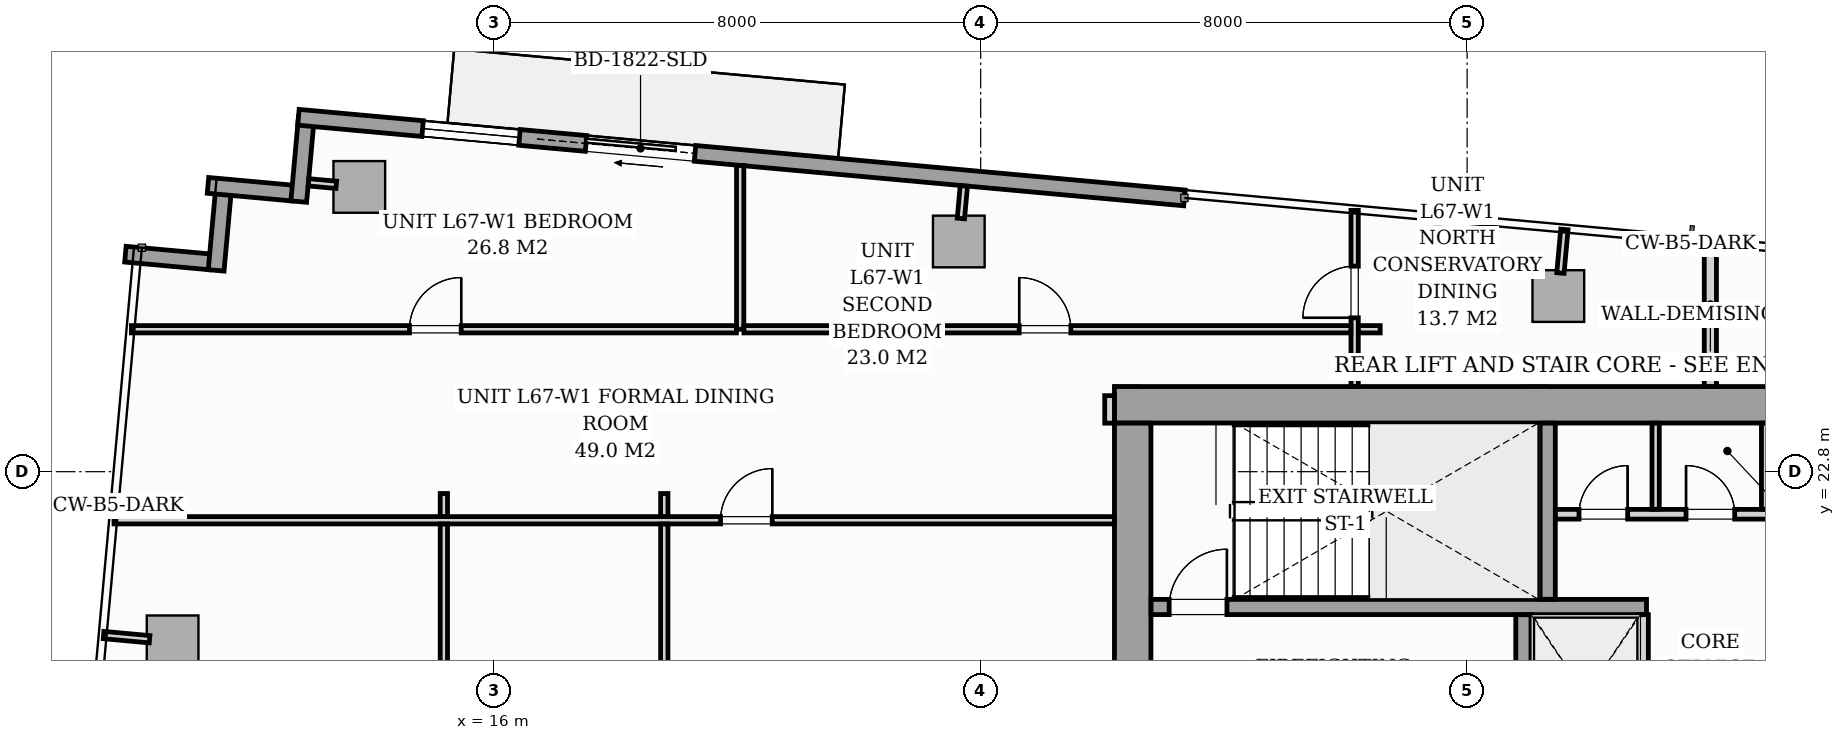
"""IFC4 building model, lengths in metres.
Left out: names, types, materials, properties, quantities, classifications, styles, units other than length and angle.
Written with IfcOpenShell. Run it as: python <this file> out.ifc"""

import sys

from ifc_helpers import new_model, si_unit, direction, frame, frame_2d, origin, origin_2d, place, context, subcontext, project, spatial, rectangle, i_section, extrude, source, transform, mapped, element, fill, save


model = new_model("IFC4")
c1 = context("Model", 3, precision=1e-05, world=origin(), true_north=direction((0.0, 1.0)))
c2 = subcontext(c1, "Body", "Model", "MODEL_VIEW")
j1 = project(units=[si_unit("LENGTHUNIT", "METRE"), si_unit("PLANEANGLEUNIT", "RADIAN")], contexts=[c1])
p1 = place(None, origin())
s1 = spatial("IfcSite", under=j1, at=p1, CompositionType="ELEMENT")
p2 = place(p1, origin())
s2 = spatial("IfcBuilding", under=s1, at=p2, CompositionType="ELEMENT")
p3 = place(p2, frame((0.0, 0.0, 233.1)))
s3 = spatial("IfcBuildingStorey", under=s2, at=p3, CompositionType="ELEMENT", Elevation=233.1)
m1 = source(origin(), c2, "Body", "SweptSolid", [
    extrude(i_section(OverallWidth=0.409, OverallDepth=0.425, WebThickness=0.033, FlangeThickness=0.052, FilletRadius=0.018, at=origin_2d()), origin(), (0.0, 0.0, 1.0), 3.296),
])
for number, where, z_axis, x_axis in (
    (1, (26.4, 24.0, 0.002), (0.0, 0.0, 1.0), (1.0, 0.0, 0.0)),
    (2, (33.12, 24.0, 0.002), (0.0, 0.0, 1.0), (1.0, 0.0, 0.0)),
):
    element("IfcColumn", number, at=place(p3, frame(where, z_axis=z_axis, x_axis=x_axis)), inside=s3, PredefinedType="PILASTER", context=c2, shape_type="MappedRepresentation", body=[
        mapped(m1, transform((0.0, 0.0, 0.0), scale=1.0)),
    ])
m2 = source(origin(), c2, "Body", "SweptSolid", [
    extrude(rectangle(XDim=0.85, YDim=0.85, at=origin_2d()), origin(), (0.0, 0.0, 1.0), 3.296),
])
for number, where, z_axis, x_axis in (
    (3, (13.781, 27.483, 0.002), (0.0, 0.0, 1.0), (0.996, -0.091, 0.0)),
    (4, (23.64, 26.585, 0.002), (0.0, 0.0, 1.0), (0.996, -0.091, 0.0)),
    (5, (33.5, 25.688, 0.002), (0.0, 0.0, 1.0), (0.996, -0.091, 0.0)),
    (6, (10.711, 20.01, 0.002), (0.0, 0.0, 1.0), (0.996, -0.091, 0.0)),
):
    element("IfcColumn", number, at=place(p3, frame(where, z_axis=z_axis, x_axis=x_axis)), inside=s3, PredefinedType="COLUMN", context=c2, shape_type="MappedRepresentation", body=[
        mapped(m2, transform((0.0, 0.0, 0.0), scale=1.0)),
    ])
for number, where, z_axis, x_axis in (
    (7, (9.935, 26.377, 0.0), (0.0, 0.0, 1.0), (0.996, -0.091, 0.0)),
    (8, (11.427, 26.111, 0.0), (0.0, 0.0, 1.0), (0.091, 0.996, 0.0)),
):
    element("IfcWall", number, at=place(p3, frame(where, z_axis=z_axis, x_axis=x_axis)), inside=s3, PredefinedType="STANDARD", context=c2, shape_type="SweptSolid", body=[
        extrude(rectangle(XDim=1.395, YDim=0.26, at=frame_2d((0.698, 0.0))), origin(), (0.0, 0.0, 1.0), 3.04),
    ])
p4 = place(p3, frame((11.293, 27.508, 0.0), z_axis=(0.0, 0.0, 1.0), x_axis=(0.995883159782, -0.090646191665, 0.0)))
e9 = element("IfcWall", 9, at=p4, inside=s3, PredefinedType="STANDARD", context=c2, shape_type="SweptSolid", body=[
    extrude(rectangle(XDim=1.395, YDim=0.26, at=frame_2d((0.698, 0.0))), origin(), (0.0, 0.0, 1.0), 3.04),
])
p5 = place(p3, frame((12.785, 27.242, 0.0), z_axis=(0.0, 0.0, 1.0), x_axis=(0.090472632758, 0.995898942023, 0.0)))
e10 = element("IfcWall", 10, at=p5, inside=s3, PredefinedType="STANDARD", context=c2, shape_type="SweptSolid", body=[
    extrude(rectangle(XDim=1.395, YDim=0.26, at=frame_2d((0.698, 0.0))), origin(), (0.0, 0.0, 1.0), 3.04),
])
p6 = place(p3, frame((12.781, 28.628, 0.0), z_axis=(0.0, 0.0, 1.0), x_axis=(0.995884584572, -0.090630536861, 0.0)))
e11 = element("IfcWall", 11, at=p6, inside=s3, PredefinedType="STANDARD", context=c2, shape_type="SweptSolid", body=[
    extrude(rectangle(XDim=14.63, YDim=0.26, at=frame_2d((7.315, 0.0))), origin(), (0.0, 0.0, 1.0), 3.04),
])
p7 = place(p6, frame((4.749, 0.0, 0.0)))
e12 = element("IfcOpeningElement", 12, at=p7, cuts=e11, PredefinedType="OPENING", context=c2, shape_type="SweptSolid", body=[
    extrude(rectangle(XDim=1.8, YDim=2.06, at=frame_2d((0.9, 1.03))), frame((0.0, 0.14, 0.0), z_axis=(0.0, -1.0, 0.0), x_axis=(1.0, 0.0, 0.0)), (0.0, 0.0, 1.0), 0.28),
])
p8 = place(p6, frame((2.05, 0.0, 0.65)))
e13 = element("IfcOpeningElement", 13, at=p8, cuts=e11, PredefinedType="OPENING", context=c2, shape_type="SweptSolid", body=[
    extrude(rectangle(XDim=1.6, YDim=1.5, at=frame_2d((0.8, 0.75))), frame((0.0, 0.14, 0.0), z_axis=(0.0, -1.0, 0.0), x_axis=(1.0, 0.0, 0.0)), (0.0, 0.0, 1.0), 0.28),
])
p9 = place(p3, frame((26.2, 23.9, 0.0), z_axis=(0.0, 0.0, 1.0), x_axis=(1.0, 0.0, 0.0)))
e14 = element("IfcWall", 14, at=p9, inside=s3, PredefinedType="SHEAR", context=c2, shape_type="SweptSolid", body=[
    extrude(rectangle(XDim=19.6, YDim=0.6, at=frame_2d((9.8, 0.0))), origin(), (0.0, 0.0, 1.0), 3.3),
])
p10 = place(p3, frame((26.5, 17.802, 0.0), z_axis=(0.0, 0.0, 1.0), x_axis=(0.0, 1.0, 0.0)))
e15 = element("IfcWall", 15, at=p10, inside=s3, PredefinedType="SHEAR", context=c2, shape_type="SweptSolid", body=[
    extrude(rectangle(XDim=5.796, YDim=0.6, at=frame_2d((2.898, 0.0))), origin(), (0.0, 0.0, 1.0), 3.3),
])
p11 = place(p3, frame((26.802, 20.575, 0.0), z_axis=(0.0, 0.0, 1.0), x_axis=(1.0, 0.0, 0.0)))
e16 = element("IfcWall", 16, at=p11, inside=s3, PredefinedType="SOLIDWALL", context=c2, shape_type="SweptSolid", body=[
    extrude(rectangle(XDim=8.148, YDim=0.25, at=frame_2d((4.074, 0.0))), origin(), (0.0, 0.0, 1.0), 3.3),
])
p12 = place(p11, frame((0.298, 0.0, 0.0)))
e17 = element("IfcOpeningElement", 17, at=p12, cuts=e16, PredefinedType="OPENING", context=c2, shape_type="SweptSolid", body=[
    extrude(rectangle(XDim=0.95, YDim=2.06, at=frame_2d((0.475, 1.03))), frame((0.0, 0.135, 0.0), z_axis=(0.0, -1.0, 0.0), x_axis=(1.0, 0.0, 0.0)), (0.0, 0.0, 1.0), 0.27),
])
p13 = place(p3, frame((33.325, 20.702, 0.0), z_axis=(0.0, 0.0, 1.0), x_axis=(0.0, 1.0, 0.0)))
e18 = element("IfcWall", 18, at=p13, inside=s3, PredefinedType="SOLIDWALL", context=c2, shape_type="SweptSolid", body=[
    extrude(rectangle(XDim=2.896, YDim=0.25, at=frame_2d((1.448, 0.0))), origin(), (0.0, 0.0, 1.0), 3.3),
])
p14 = place(p3, frame((32.925, 17.802, 0.0), z_axis=(0.0, 0.0, 1.0), x_axis=(0.0, 1.0, 0.0)))
e19 = element("IfcWall", 19, at=p14, inside=s3, PredefinedType="SOLIDWALL", context=c2, shape_type="SweptSolid", body=[
    extrude(rectangle(XDim=2.646, YDim=0.25, at=frame_2d((1.323, 0.0))), origin(), (0.0, 0.0, 1.0), 3.3),
])
p15 = place(p14, frame((0.548, 0.0, 0.0)))
e20 = element("IfcOpeningElement", 20, at=p15, cuts=e19, PredefinedType="OPENING", context=c2, shape_type="SweptSolid", body=[
    extrude(rectangle(XDim=1.1, YDim=2.08, at=frame_2d((0.55, 1.04))), frame((0.0, 0.135, 0.0), z_axis=(0.0, -1.0, 0.0), x_axis=(1.0, 0.0, 0.0)), (0.0, 0.0, 1.0), 0.27),
])
p16 = place(p3, frame((34.9, 17.802, 0.0), z_axis=(0.0, 0.0, 1.0), x_axis=(0.0, 1.0, 0.0)))
e21 = element("IfcWall", 21, at=p16, inside=s3, PredefinedType="PARTITIONING", context=c2, shape_type="SweptSolid", body=[
    extrude(rectangle(XDim=2.646, YDim=0.16, at=frame_2d((1.323, 0.0))), origin(), (0.0, 0.0, 1.0), 3.04),
])
p17 = place(p3, frame((33.452, 22.1, 0.0), z_axis=(0.0, 0.0, 1.0), x_axis=(1.0, 0.0, 0.0)))
e22 = element("IfcWall", 22, at=p17, inside=s3, PredefinedType="PARTITIONING", context=c2, shape_type="SweptSolid", body=[
    extrude(rectangle(XDim=5.096, YDim=0.16, at=frame_2d((2.548, 0.0))), origin(), (0.0, 0.0, 1.0), 3.04),
])
p18 = place(p17, frame((0.388, 0.0, 0.0)))
e23 = element("IfcOpeningElement", 23, at=p18, cuts=e22, PredefinedType="OPENING", context=c2, shape_type="SweptSolid", body=[
    extrude(rectangle(XDim=0.8, YDim=2.05, at=frame_2d((0.4, 1.025))), frame((0.0, 0.09, 0.0), z_axis=(0.0, -1.0, 0.0), x_axis=(1.0, 0.0, 0.0)), (0.0, 0.0, 1.0), 0.18),
])
p19 = place(p17, frame((2.148, 0.0, 0.0)))
e24 = element("IfcOpeningElement", 24, at=p19, cuts=e22, PredefinedType="OPENING", context=c2, shape_type="SweptSolid", body=[
    extrude(rectangle(XDim=0.8, YDim=2.05, at=frame_2d((0.4, 1.025))), frame((0.0, 0.09, 0.0), z_axis=(0.0, -1.0, 0.0), x_axis=(1.0, 0.0, 0.0)), (0.0, 0.0, 1.0), 0.18),
])
p20 = place(p17, frame((3.908, 0.0, 0.0)))
e25 = element("IfcOpeningElement", 25, at=p20, cuts=e22, PredefinedType="OPENING", context=c2, shape_type="SweptSolid", body=[
    extrude(rectangle(XDim=0.8, YDim=2.05, at=frame_2d((0.4, 1.025))), frame((0.0, 0.09, 0.0), z_axis=(0.0, -1.0, 0.0), x_axis=(1.0, 0.0, 0.0)), (0.0, 0.0, 1.0), 0.18),
])
for number, where, z_axis, x_axis in (
    (26, (35.1, 22.182, 0.0), (0.0, 0.0, 1.0), (0.0, 1.0, 0.0)),
    (27, (36.9, 22.182, 0.0), (0.0, 0.0, 1.0), (0.0, 1.0, 0.0)),
):
    element("IfcWall", number, at=place(p3, frame(where, z_axis=z_axis, x_axis=x_axis)), inside=s3, PredefinedType="PARTITIONING", context=c2, shape_type="SweptSolid", body=[
        extrude(rectangle(XDim=1.416, YDim=0.12, at=frame_2d((0.708, 0.0))), origin(), (0.0, 0.0, 1.0), 3.04),
    ])
p21 = place(p3, frame((26.12, 23.598, 0.0), z_axis=(0.0, 0.0, 1.0), x_axis=(0.0, 1.0, 0.0)))
e28 = element("IfcWall", 28, at=p21, inside=s3, PredefinedType="PARTITIONING", context=c2, shape_type="SweptSolid", body=[
    extrude(rectangle(XDim=0.452, YDim=0.16, at=frame_2d((0.226, 0.0))), origin(), (0.0, 0.0, 1.0), 3.04),
])
p22 = place(p3, frame((36.0, 24.202, 0.0), z_axis=(0.0, 0.0, 1.0), x_axis=(0.0, 1.0, 0.0)))
e29 = element("IfcWall", 29, at=p22, inside=s3, PredefinedType="PARTITIONING", context=c2, shape_type="SweptSolid", body=[
    extrude(rectangle(XDim=2.363, YDim=0.2, at=frame_2d((1.182, 0.0))), origin(), (0.0, 0.0, 1.0), 3.04),
])
p23 = place(p3, frame((30.15, 24.202, 0.0), z_axis=(0.0, 0.0, 1.0), x_axis=(0.0, 1.0, 0.0)))
e30 = element("IfcWall", 30, at=p23, inside=s3, PredefinedType="PARTITIONING", context=c2, shape_type="SweptSolid", body=[
    extrude(rectangle(XDim=2.896, YDim=0.12, at=frame_2d((1.448, 0.0))), origin(), (0.0, 0.0, 1.0), 3.04),
])
p24 = place(p23, frame((1.128, 0.0, 0.0)))
e31 = element("IfcOpeningElement", 31, at=p24, cuts=e30, PredefinedType="OPENING", context=c2, shape_type="SweptSolid", body=[
    extrude(rectangle(XDim=0.85, YDim=2.05, at=frame_2d((0.425, 1.025))), frame((0.0, 0.07, 0.0), z_axis=(0.0, -1.0, 0.0), x_axis=(1.0, 0.0, 0.0)), (0.0, 0.0, 1.0), 0.14),
])
p25 = place(p3, frame((20.045, 25.142, 0.0), z_axis=(0.0, 0.0, 1.0), x_axis=(0.0, 1.0, 0.0)))
e32 = element("IfcWall", 32, at=p25, inside=s3, PredefinedType="PARTITIONING", context=c2, shape_type="SweptSolid", body=[
    extrude(rectangle(XDim=2.692, YDim=0.12, at=frame_2d((1.346, 0.0))), origin(), (0.0, 0.0, 1.0), 3.04),
])
p26 = place(p3, frame((10.034, 25.142, 0.0), z_axis=(0.0, 0.0, 1.0), x_axis=(1.0, 0.0, 0.0)))
e33 = element("IfcWall", 33, at=p26, inside=s3, PredefinedType="PARTITIONING", context=c2, shape_type="SweptSolid", body=[
    extrude(rectangle(XDim=9.949, YDim=0.12, at=frame_2d((4.975, 0.0))), origin(), (0.0, 0.0, 1.0), 3.04),
])
p27 = place(p26, frame((4.573, 0.0, 0.0)))
e34 = element("IfcOpeningElement", 34, at=p27, cuts=e33, PredefinedType="OPENING", context=c2, shape_type="SweptSolid", body=[
    extrude(rectangle(XDim=0.85, YDim=2.05, at=frame_2d((0.425, 1.025))), frame((0.0, 0.07, 0.0), z_axis=(0.0, -1.0, 0.0), x_axis=(1.0, 0.0, 0.0)), (0.0, 0.0, 1.0), 0.14),
])
p28 = place(p3, frame((20.107, 25.142, 0.0), z_axis=(0.0, 0.0, 1.0), x_axis=(1.0, 0.0, 0.0)))
e35 = element("IfcWall", 35, at=p28, inside=s3, PredefinedType="PARTITIONING", context=c2, shape_type="SweptSolid", body=[
    extrude(rectangle(XDim=9.981, YDim=0.12, at=frame_2d((4.99, 0.0))), origin(), (0.0, 0.0, 1.0), 3.04),
])
p29 = place(p28, frame((4.526, 0.0, 0.0)))
e36 = element("IfcOpeningElement", 36, at=p29, cuts=e35, PredefinedType="OPENING", context=c2, shape_type="SweptSolid", body=[
    extrude(rectangle(XDim=0.85, YDim=2.05, at=frame_2d((0.425, 1.025))), frame((0.0, 0.07, 0.0), z_axis=(0.0, -1.0, 0.0), x_axis=(1.0, 0.0, 0.0)), (0.0, 0.0, 1.0), 0.14),
])
p30 = place(p3, frame((30.212, 25.142, 0.0), z_axis=(0.0, 0.0, 1.0), x_axis=(1.0, 0.0, 0.0)))
e37 = element("IfcWall", 37, at=p30, inside=s3, PredefinedType="PARTITIONING", context=c2, shape_type="SweptSolid", body=[
    extrude(rectangle(XDim=0.358, YDim=0.12, at=frame_2d((0.179, 0.0))), origin(), (0.0, 0.0, 1.0), 3.04),
])
p31 = place(p3, frame((9.748, 22.001, 0.0), z_axis=(0.0, 0.0, 1.0), x_axis=(1.0, 0.0, 0.0)))
e38 = element("IfcWall", 38, at=p31, inside=s3, PredefinedType="PARTITIONING", context=c2, shape_type="SweptSolid", body=[
    extrude(rectangle(XDim=16.45, YDim=0.12, at=frame_2d((8.225, 0.0))), origin(), (0.0, 0.0, 1.0), 3.04),
])
p32 = place(p31, frame((9.974, 0.0, 0.0)))
e39 = element("IfcOpeningElement", 39, at=p32, cuts=e38, PredefinedType="OPENING", context=c2, shape_type="SweptSolid", body=[
    extrude(rectangle(XDim=0.85, YDim=2.05, at=frame_2d((0.425, 1.025))), frame((0.0, 0.07, 0.0), z_axis=(0.0, -1.0, 0.0), x_axis=(1.0, 0.0, 0.0)), (0.0, 0.0, 1.0), 0.14),
])
p33 = place(p3, frame((15.172, 11.858, 0.0), z_axis=(0.0, 0.0, 1.0), x_axis=(0.0, 1.0, 0.0)))
e40 = element("IfcWall", 40, at=p33, inside=s3, PredefinedType="PARTITIONING", context=c2, shape_type="SweptSolid", body=[
    extrude(rectangle(XDim=10.081, YDim=0.12, at=frame_2d((5.041, 0.0))), origin(), (0.0, 0.0, 1.0), 3.04),
])
p34 = place(p33, frame((4.615, 0.0, 0.0)))
e41 = element("IfcOpeningElement", 41, at=p34, cuts=e40, PredefinedType="OPENING", context=c2, shape_type="SweptSolid", body=[
    extrude(rectangle(XDim=0.85, YDim=2.05, at=frame_2d((0.425, 1.025))), frame((0.0, 0.07, 0.0), z_axis=(0.0, -1.0, 0.0), x_axis=(1.0, 0.0, 0.0)), (0.0, 0.0, 1.0), 0.14),
])
p35 = place(p3, frame((15.172, 22.063, 0.0), z_axis=(0.0, 0.0, 1.0), x_axis=(0.0, 1.0, 0.0)))
e42 = element("IfcWall", 42, at=p35, inside=s3, PredefinedType="PARTITIONING", context=c2, shape_type="SweptSolid", body=[
    extrude(rectangle(XDim=0.378, YDim=0.12, at=frame_2d((0.189, 0.0))), origin(), (0.0, 0.0, 1.0), 3.04),
])
p36 = place(p3, frame((18.797, 11.858, 0.0), z_axis=(0.0, 0.0, 1.0), x_axis=(0.0, 1.0, 0.0)))
e43 = element("IfcWall", 43, at=p36, inside=s3, PredefinedType="PARTITIONING", context=c2, shape_type="SweptSolid", body=[
    extrude(rectangle(XDim=10.081, YDim=0.12, at=frame_2d((5.041, 0.0))), origin(), (0.0, 0.0, 1.0), 3.04),
])
p37 = place(p36, frame((4.615, 0.0, 0.0)))
e44 = element("IfcOpeningElement", 44, at=p37, cuts=e43, PredefinedType="OPENING", context=c2, shape_type="SweptSolid", body=[
    extrude(rectangle(XDim=0.85, YDim=2.05, at=frame_2d((0.425, 1.025))), frame((0.0, 0.07, 0.0), z_axis=(0.0, -1.0, 0.0), x_axis=(1.0, 0.0, 0.0)), (0.0, 0.0, 1.0), 0.14),
])
p38 = place(p3, frame((18.797, 22.063, 0.0), z_axis=(0.0, 0.0, 1.0), x_axis=(0.0, 1.0, 0.0)))
e45 = element("IfcWall", 45, at=p38, inside=s3, PredefinedType="PARTITIONING", context=c2, shape_type="SweptSolid", body=[
    extrude(rectangle(XDim=0.378, YDim=0.12, at=frame_2d((0.189, 0.0))), origin(), (0.0, 0.0, 1.0), 3.04),
])
p39 = place(p3, frame((13.403, 27.517, 0.0), z_axis=(0.0, 0.0, 1.0), x_axis=(-0.995884462012, 0.090631883588, 0.0)))
e46 = element("IfcWall", 46, at=p39, inside=s3, PredefinedType="PARTITIONING", context=c2, shape_type="SweptSolid", body=[
    extrude(rectangle(XDim=0.458, YDim=0.12, at=frame_2d((0.229, 0.0))), origin(), (0.0, 0.0, 1.0), 3.04),
])
p40 = place(p3, frame((23.675, 26.964, 0.0), z_axis=(0.0, 0.0, 1.0), x_axis=(0.090740281653, 0.995874591144, 0.0)))
e47 = element("IfcWall", 47, at=p40, inside=s3, PredefinedType="PARTITIONING", context=c2, shape_type="SweptSolid", body=[
    extrude(rectangle(XDim=0.538, YDim=0.12, at=frame_2d((0.269, 0.0))), origin(), (0.0, 0.0, 1.0), 3.04),
])
p41 = place(p3, frame((33.534, 26.067, 0.0), z_axis=(0.0, 0.0, 1.0), x_axis=(0.090535746043, 0.995893206468, 0.0)))
e48 = element("IfcWall", 48, at=p41, inside=s3, PredefinedType="PARTITIONING", context=c2, shape_type="SweptSolid", body=[
    extrude(rectangle(XDim=0.72, YDim=0.12, at=frame_2d((0.36, 0.0))), origin(), (0.0, 0.0, 1.0), 3.04),
])
p42 = place(p3, frame((10.333, 20.045, 0.0), z_axis=(0.0, 0.0, 1.0), x_axis=(-0.995890573658, 0.09056470228, 0.0)))
e49 = element("IfcWall", 49, at=p42, inside=s3, PredefinedType="PARTITIONING", context=c2, shape_type="SweptSolid", body=[
    extrude(rectangle(XDim=0.76, YDim=0.12, at=frame_2d((0.38, 0.0))), origin(), (0.0, 0.0, 1.0), 3.04),
])
m3 = source(origin(), c2, "Body", "SweptSolid", [
    extrude(rectangle(XDim=1.8, YDim=2.06, at=frame_2d((0.9, 1.03))), frame((0.0, 0.025, 0.0), z_axis=(0.0, -1.0, 0.0), x_axis=(1.0, 0.0, 0.0)), (0.0, 0.0, 1.0), 0.05),
])
p43 = place(p7, origin())
e50 = element("IfcDoor", 50, at=p43, inside=s3, OperationType="SLIDING_TO_LEFT", PredefinedType="DOOR", context=c2, shape_type="MappedRepresentation", body=[
    mapped(m3, transform((0.0, 0.0, 0.0), scale=1.0)),
])
fill(e12, e50)
m4 = source(origin(), c2, "Body", "SweptSolid", [
    extrude(rectangle(XDim=1.6, YDim=1.5, at=frame_2d((0.8, 0.75))), frame((0.0, 0.03, 0.0), z_axis=(0.0, -1.0, 0.0), x_axis=(1.0, 0.0, 0.0)), (0.0, 0.0, 1.0), 0.06),
])
p44 = place(p8, origin())
e51 = element("IfcWindow", 51, at=p44, inside=s3, PartitioningType="SINGLE_PANEL", PredefinedType="WINDOW", context=c2, shape_type="MappedRepresentation", body=[
    mapped(m4, transform((0.0, 0.0, 0.0), scale=1.0)),
])
fill(e13, e51)
m5 = source(origin(), c2, "Body", "SweptSolid", [
    extrude(rectangle(XDim=0.95, YDim=2.06, at=frame_2d((0.475, 1.03))), frame((0.0, 0.025, 0.0), z_axis=(0.0, -1.0, 0.0), x_axis=(1.0, 0.0, 0.0)), (0.0, 0.0, 1.0), 0.05),
])
p45 = place(p12, origin())
e52 = element("IfcDoor", 52, at=p45, inside=s3, OperationType="SINGLE_SWING_RIGHT", PredefinedType="DOOR", context=c2, shape_type="MappedRepresentation", body=[
    mapped(m5, transform((0.0, 0.0, 0.0), scale=1.0)),
])
fill(e17, e52)
m6 = source(origin(), c2, "Body", "SweptSolid", [
    extrude(rectangle(XDim=0.8, YDim=2.05, at=frame_2d((0.4, 1.025))), frame((0.0, 0.025, 0.0), z_axis=(0.0, -1.0, 0.0), x_axis=(1.0, 0.0, 0.0)), (0.0, 0.0, 1.0), 0.05),
])
p46 = place(p18, origin())
e53 = element("IfcDoor", 53, at=p46, inside=s3, OperationType="SINGLE_SWING_RIGHT", PredefinedType="DOOR", context=c2, shape_type="MappedRepresentation", body=[
    mapped(m6, transform((0.0, 0.0, 0.0), scale=1.0)),
])
fill(e23, e53)
p47 = place(p19, origin())
e54 = element("IfcDoor", 54, at=p47, inside=s3, OperationType="SINGLE_SWING_LEFT", PredefinedType="DOOR", context=c2, shape_type="MappedRepresentation", body=[
    mapped(m6, transform((0.0, 0.0, 0.0), scale=1.0)),
])
fill(e24, e54)
m7 = source(origin(), c2, "Body", "SweptSolid", [
    extrude(rectangle(XDim=0.85, YDim=2.05, at=frame_2d((0.425, 1.025))), frame((0.0, 0.025, 0.0), z_axis=(0.0, -1.0, 0.0), x_axis=(1.0, 0.0, 0.0)), (0.0, 0.0, 1.0), 0.05),
])
p48 = place(p24, origin())
e55 = element("IfcDoor", 55, at=p48, inside=s3, OperationType="SINGLE_SWING_LEFT", PredefinedType="DOOR", context=c2, shape_type="MappedRepresentation", body=[
    mapped(m7, transform((0.0, 0.0, 0.0), scale=1.0)),
])
fill(e31, e55)
p49 = place(p27, origin())
e56 = element("IfcDoor", 56, at=p49, inside=s3, OperationType="SINGLE_SWING_RIGHT", PredefinedType="DOOR", context=c2, shape_type="MappedRepresentation", body=[
    mapped(m7, transform((0.0, 0.0, 0.0), scale=1.0)),
])
fill(e34, e56)
p50 = place(p29, origin())
e57 = element("IfcDoor", 57, at=p50, inside=s3, OperationType="SINGLE_SWING_LEFT", PredefinedType="DOOR", context=c2, shape_type="MappedRepresentation", body=[
    mapped(m7, transform((0.0, 0.0, 0.0), scale=1.0)),
])
fill(e36, e57)
p51 = place(p32, origin())
e58 = element("IfcDoor", 58, at=p51, inside=s3, OperationType="SINGLE_SWING_RIGHT", PredefinedType="DOOR", context=c2, shape_type="MappedRepresentation", body=[
    mapped(m7, transform((0.0, 0.0, 0.0), scale=1.0)),
])
fill(e39, e58)
save(model, sys.argv[1])
